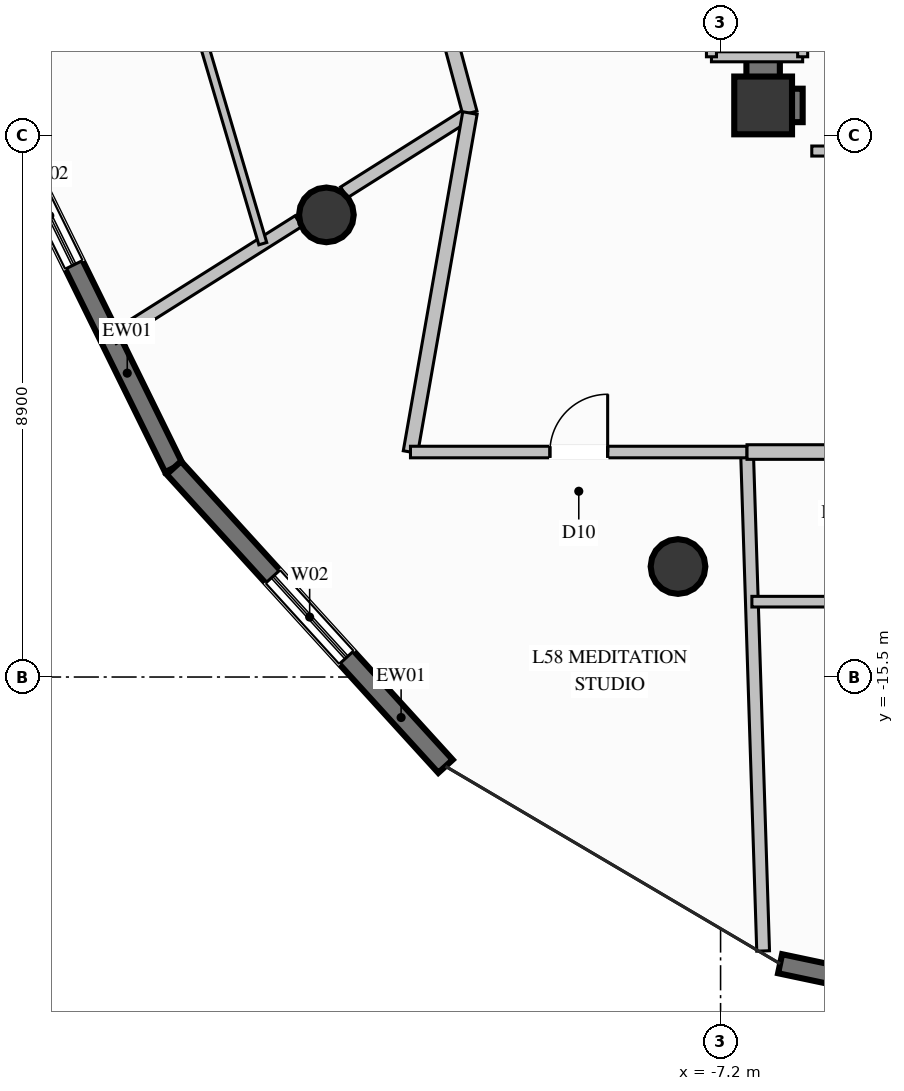
"""IFC4 building model, lengths in metres.
Left out: names, types, materials, properties, quantities, classifications, styles, units other than length and angle.
Written with IfcOpenShell. Run it as: python <this file> out.ifc"""

import sys

from ifc_helpers import new_model, si_unit, direction, frame, frame_2d, origin, origin_2d, place, context, subcontext, project, spatial, rectangle, circle, extrude, element, fill, save


model = new_model("IFC4")
c1 = context("Model", 3, precision=1e-05, world=origin(), true_north=direction((0.0, 1.0)))
c2 = subcontext(c1, "Body", "Model", "MODEL_VIEW")
j1 = project(units=[si_unit("LENGTHUNIT", "METRE"), si_unit("PLANEANGLEUNIT", "RADIAN")], contexts=[c1])
p1 = place(None, origin())
s1 = spatial("IfcSite", under=j1, at=p1, CompositionType="ELEMENT")
p2 = place(p1, origin())
s2 = spatial("IfcBuilding", under=s1, at=p2, CompositionType="ELEMENT")
p3 = place(p2, frame((0.0, 0.0, 223.6)))
s3 = spatial("IfcBuildingStorey", under=s2, at=p3, CompositionType="ELEMENT", Elevation=223.6)
p4 = place(p3, frame((-6.5, -6.1, 0.0), z_axis=(0.0, 0.0, 1.0), x_axis=(1.0, 0.0, 0.0)))
e1 = element("IfcColumn", 1, at=p4, inside=s3, PredefinedType="COLUMN", context=c2, shape_type="SweptSolid", body=[
    extrude(rectangle(XDim=0.95, YDim=0.95, at=origin_2d()), origin(), (0.0, 0.0, 1.0), 3.6),
])
p5 = place(p3, frame((-6.225, -6.1, 0.0), z_axis=(0.0, 0.0, 1.0), x_axis=(1.0, 0.0, 0.0)))
e2 = element("IfcWall", 2, at=p5, inside=s3, PredefinedType="SHEAR", context=c2, shape_type="SweptSolid", body=[
    extrude(rectangle(XDim=0.375, YDim=0.55, at=frame_2d((0.188, 0.0))), origin(), (0.0, 0.0, 1.0), 3.6),
])
p6 = place(p3, frame((-6.5, -6.375, 0.0), z_axis=(0.0, 0.0, 1.0), x_axis=(0.0, 1.0, 0.0)))
e3 = element("IfcWall", 3, at=p6, inside=s3, PredefinedType="SHEAR", context=c2, shape_type="SweptSolid", body=[
    extrude(rectangle(XDim=3.025, YDim=0.55, at=frame_2d((1.512, 0.0))), origin(), (0.0, 0.0, 1.0), 3.6),
])
for number, where, z_axis, x_axis in (
    (4, (-13.683, -7.9, 0.0), (0.0, 0.0, 1.0), (1.0, 0.0, 0.0)),
    (5, (-7.9, -13.683, 0.0), (0.0, 0.0, 1.0), (1.0, 0.0, 0.0)),
):
    element("IfcColumn", number, at=place(p3, frame(where, z_axis=z_axis, x_axis=x_axis)), inside=s3, PredefinedType="COLUMN", context=c2, shape_type="SweptSolid", body=[
        extrude(circle(Radius=0.45, at=origin_2d()), origin(), (0.0, 0.0, 1.0), 3.6),
    ])
p7 = place(p3, frame((-16.192, -12.06, 0.0), z_axis=(0.0, 0.0, 1.0), x_axis=(-0.441432699622, 0.897294361792, 0.0)))
e6 = element("IfcWall", 6, at=p7, inside=s3, PredefinedType="SOLIDWALL", context=c2, shape_type="SweptSolid", body=[
    extrude(rectangle(XDim=6.785, YDim=0.32, at=frame_2d((3.393, 0.0))), origin(), (0.0, 0.0, 1.0), 3.36),
])
p8 = place(p7, frame((3.721, 0.0, 0.35)))
e7 = element("IfcOpeningElement", 7, at=p8, cuts=e6, PredefinedType="OPENING", context=c2, shape_type="SweptSolid", body=[
    extrude(rectangle(XDim=1.8, YDim=2.6, at=frame_2d((0.9, 1.3))), frame((0.0, 0.17, 0.0), z_axis=(0.0, -1.0, 0.0), x_axis=(1.0, 0.0, 0.0)), (0.0, 0.0, 1.0), 0.34),
])
p9 = place(p3, frame((-11.724, -16.968, 0.0), z_axis=(0.0, 0.0, 1.0), x_axis=(-0.673166995422, 0.739490497758, 0.0)))
e8 = element("IfcWall", 8, at=p9, inside=s3, PredefinedType="SOLIDWALL", context=c2, shape_type="SweptSolid", body=[
    extrude(rectangle(XDim=6.637, YDim=0.32, at=frame_2d((3.318, 0.0))), origin(), (0.0, 0.0, 1.0), 3.36),
])
p10 = place(p9, frame((2.419, 0.0, 0.35)))
e9 = element("IfcOpeningElement", 9, at=p10, cuts=e8, PredefinedType="OPENING", context=c2, shape_type="SweptSolid", body=[
    extrude(rectangle(XDim=1.8, YDim=2.6, at=frame_2d((0.9, 1.3))), frame((0.0, 0.17, 0.0), z_axis=(0.0, -1.0, 0.0), x_axis=(1.0, 0.0, 0.0)), (0.0, 0.0, 1.0), 0.34),
])
p11 = place(p3, frame((-0.222, -21.483, 0.0), z_axis=(0.0, 0.0, 1.0), x_axis=(-0.978389375522, 0.206770959917, 0.0)))
e10 = element("IfcWall", 10, at=p11, inside=s3, PredefinedType="SOLIDWALL", context=c2, shape_type="SweptSolid", body=[
    extrude(rectangle(XDim=6.132, YDim=0.32, at=frame_2d((3.066, 0.0))), origin(), (0.0, 0.0, 1.0), 3.36),
])
p12 = place(p11, frame((2.166, 0.0, 0.35)))
e11 = element("IfcOpeningElement", 11, at=p12, cuts=e10, PredefinedType="OPENING", context=c2, shape_type="SweptSolid", body=[
    extrude(rectangle(XDim=1.8, YDim=2.6, at=frame_2d((0.9, 1.3))), frame((0.0, 0.17, 0.0), z_axis=(0.0, -1.0, 0.0), x_axis=(1.0, 0.0, 0.0)), (0.0, 0.0, 1.0), 0.34),
])
p13 = place(p3, frame((-7.35, -5.3, 0.0), z_axis=(0.0, 0.0, 1.0), x_axis=(1.0, 0.0, 0.0)))
e12 = element("IfcWall", 12, at=p13, inside=s3, PredefinedType="PARTITIONING", context=c2, shape_type="SweptSolid", body=[
    extrude(rectangle(XDim=1.5, YDim=0.165, at=frame_2d((0.75, 0.0))), origin(), (0.0, 0.0, 1.0), 2.445),
])
p14 = place(p3, frame((-5.85, -5.3, 0.0), z_axis=(0.0, 0.0, 1.0), x_axis=(0.0, 1.0, 0.0)))
e13 = element("IfcWall", 13, at=p14, inside=s3, PredefinedType="PARTITIONING", context=c2, shape_type="SweptSolid", body=[
    extrude(rectangle(XDim=2.5, YDim=0.165, at=frame_2d((1.25, 0.0))), origin(), (0.0, 0.0, 1.0), 2.445),
])
p15 = place(p3, frame((-7.35, -2.8, 0.0), z_axis=(0.0, 0.0, 1.0), x_axis=(0.0, -1.0, 0.0)))
e14 = element("IfcWall", 14, at=p15, inside=s3, PredefinedType="PARTITIONING", context=c2, shape_type="SweptSolid", body=[
    extrude(rectangle(XDim=2.5, YDim=0.165, at=frame_2d((1.25, 0.0))), origin(), (0.0, 0.0, 1.0), 3.36),
])
p16 = place(p15, frame((0.775, 0.0, 0.0)))
e15 = element("IfcOpeningElement", 15, at=p16, cuts=e14, PredefinedType="OPENING", context=c2, shape_type="SweptSolid", body=[
    extrude(rectangle(XDim=0.95, YDim=2.1, at=frame_2d((0.475, 1.05))), frame((0.0, 0.093, 0.0), z_axis=(0.0, -1.0, 0.0), x_axis=(1.0, 0.0, 0.0)), (0.0, 0.0, 1.0), 0.185),
])
p17 = place(p3, frame((-5.7, -6.85, 0.0), z_axis=(0.0, 0.0, 1.0), x_axis=(1.0, 0.0, 0.0)))
e16 = element("IfcWall", 16, at=p17, inside=s3, PredefinedType="PARTITIONING", context=c2, shape_type="SweptSolid", body=[
    extrude(rectangle(XDim=9.65, YDim=0.165, at=frame_2d((4.825, 0.0))), origin(), (0.0, 0.0, 1.0), 2.445),
])
p18 = place(p17, frame((4.35, 0.0, 0.0)))
e17 = element("IfcOpeningElement", 17, at=p18, cuts=e16, PredefinedType="OPENING", context=c2, shape_type="SweptSolid", body=[
    extrude(rectangle(XDim=0.95, YDim=2.1, at=frame_2d((0.475, 1.05))), frame((0.0, 0.093, 0.0), z_axis=(0.0, -1.0, 0.0), x_axis=(1.0, 0.0, 0.0)), (0.0, 0.0, 1.0), 0.185),
])
p19 = place(p3, frame((-11.322, -6.225, 0.0), z_axis=(0.0, 0.0, 1.0), x_axis=(-0.846059580186, -0.533088348001, 0.0)))
e18 = element("IfcWall", 18, at=p19, inside=s3, PredefinedType="PARTITIONING", context=c2, shape_type="SweptSolid", body=[
    extrude(rectangle(XDim=2.448, YDim=0.21, at=frame_2d((1.224, 0.0))), origin(), (0.0, 0.0, 1.0), 2.801),
])
p20 = place(p3, frame((-14.142, -8.003, 0.0), z_axis=(0.0, 0.0, 1.0), x_axis=(-0.84595942636, -0.533247268115, 0.0)))
e19 = element("IfcWall", 19, at=p20, inside=s3, PredefinedType="PARTITIONING", context=c2, shape_type="SweptSolid", body=[
    extrude(rectangle(XDim=3.61, YDim=0.21, at=frame_2d((1.805, 0.0))), origin(), (0.0, 0.0, 1.0), 3.36),
])
p21 = place(p3, frame((-13.05, 0.2, 0.0), z_axis=(0.0, 0.0, 1.0), x_axis=(0.259722121469, -0.965683395125, 0.0)))
e20 = element("IfcWall", 20, at=p21, inside=s3, PredefinedType="PARTITIONING", context=c2, shape_type="SweptSolid", body=[
    extrude(rectangle(XDim=6.653, YDim=0.24, at=frame_2d((3.327, 0.0))), origin(), (0.0, 0.0, 1.0), 3.36),
])
p22 = place(p3, frame((-17.225, 0.084, 0.0), z_axis=(0.0, 0.0, 1.0), x_axis=(0.283077593479, -0.959097010771, 0.0)))
e21 = element("IfcWall", 21, at=p22, inside=s3, PredefinedType="PARTITIONING", context=c2, shape_type="SweptSolid", body=[
    extrude(rectangle(XDim=8.818, YDim=0.135, at=frame_2d((4.409, 0.0))), origin(), (0.0, 0.0, 1.0), 3.36),
])
p23 = place(p22, frame((3.934, 0.0, 0.0)))
e22 = element("IfcOpeningElement", 22, at=p23, cuts=e21, PredefinedType="OPENING", context=c2, shape_type="SweptSolid", body=[
    extrude(rectangle(XDim=0.95, YDim=2.1, at=frame_2d((0.475, 1.05))), frame((0.0, 0.078, 0.0), z_axis=(0.0, -1.0, 0.0), x_axis=(1.0, 0.0, 0.0)), (0.0, 0.0, 1.0), 0.155),
])
p24 = place(p3, frame((-6.765, -11.8, 0.0), z_axis=(0.0, 0.0, 1.0), x_axis=(0.032268128202, -0.99947924836, 0.0)))
e23 = element("IfcWall", 23, at=p24, inside=s3, PredefinedType="PARTITIONING", context=c2, shape_type="SweptSolid", body=[
    extrude(rectangle(XDim=8.209, YDim=0.21, at=frame_2d((4.104, 0.0))), origin(), (0.0, 0.0, 1.0), 3.36),
])
p25 = place(p3, frame((-11.322, -6.225, 0.0), z_axis=(0.0, 0.0, 1.0), x_axis=(-0.172793604918, -0.984958054995, 0.0)))
e24 = element("IfcWall", 24, at=p25, inside=s3, PredefinedType="PARTITIONING", context=c2, shape_type="SweptSolid", body=[
    extrude(rectangle(XDim=5.66, YDim=0.24, at=frame_2d((2.83, 0.0))), origin(), (0.0, 0.0, 1.0), 3.36),
])
p26 = place(p3, frame((-12.3, -11.8, 0.0), z_axis=(0.0, 0.0, 1.0), x_axis=(1.0, 0.0, 0.0)))
e25 = element("IfcWall", 25, at=p26, inside=s3, PredefinedType="PARTITIONING", context=c2, shape_type="SweptSolid", body=[
    extrude(rectangle(XDim=5.535, YDim=0.19, at=frame_2d((2.768, 0.0))), origin(), (0.0, 0.0, 1.0), 3.36),
])
p27 = place(p26, frame((2.293, 0.0, 0.0)))
e26 = element("IfcOpeningElement", 26, at=p27, cuts=e25, PredefinedType="OPENING", context=c2, shape_type="SweptSolid", body=[
    extrude(rectangle(XDim=0.95, YDim=2.1, at=frame_2d((0.475, 1.05))), frame((0.0, 0.105, 0.0), z_axis=(0.0, -1.0, 0.0), x_axis=(1.0, 0.0, 0.0)), (0.0, 0.0, 1.0), 0.21),
])
p28 = place(p3, frame((-6.765, -11.8, 0.0), z_axis=(0.0, 0.0, 1.0), x_axis=(1.0, 0.0, 0.0)))
e27 = element("IfcWall", 27, at=p28, inside=s3, PredefinedType="PARTITIONING", context=c2, shape_type="SweptSolid", body=[
    extrude(rectangle(XDim=6.765, YDim=0.24, at=frame_2d((3.382, 0.0))), origin(), (0.0, 0.0, 1.0), 3.36),
])
p29 = place(p3, frame((-6.685, -14.261, 0.0), z_axis=(0.0, 0.0, 1.0), x_axis=(1.0, 0.0, 0.0)))
e28 = element("IfcWall", 28, at=p29, inside=s3, PredefinedType="PLUMBINGWALL", context=c2, shape_type="SweptSolid", body=[
    extrude(rectangle(XDim=6.685, YDim=0.175, at=frame_2d((3.343, 0.0))), origin(), (0.0, 0.0, 1.0), 2.929),
])
p30 = place(p8, origin())
e29 = element("IfcWindow", 29, at=p30, inside=s3, PartitioningType="SINGLE_PANEL", PredefinedType="WINDOW", context=c2, shape_type="SweptSolid", body=[
    extrude(rectangle(XDim=1.8, YDim=2.6, at=frame_2d((0.9, 1.3))), frame((0.0, 0.03, 0.0), z_axis=(0.0, -1.0, 0.0), x_axis=(1.0, 0.0, 0.0)), (0.0, 0.0, 1.0), 0.06),
])
fill(e7, e29)
p31 = place(p10, origin())
e30 = element("IfcWindow", 30, at=p31, inside=s3, PartitioningType="SINGLE_PANEL", PredefinedType="WINDOW", context=c2, shape_type="SweptSolid", body=[
    extrude(rectangle(XDim=1.8, YDim=2.6, at=frame_2d((0.9, 1.3))), frame((0.0, 0.03, 0.0), z_axis=(0.0, -1.0, 0.0), x_axis=(1.0, 0.0, 0.0)), (0.0, 0.0, 1.0), 0.06),
])
fill(e9, e30)
p32 = place(p27, origin())
e31 = element("IfcDoor", 31, at=p32, inside=s3, OperationType="SINGLE_SWING_RIGHT", PredefinedType="DOOR", context=c2, shape_type="SweptSolid", body=[
    extrude(rectangle(XDim=0.95, YDim=2.1, at=frame_2d((0.475, 1.05))), frame((0.0, 0.025, 0.0), z_axis=(0.0, -1.0, 0.0), x_axis=(1.0, 0.0, 0.0)), (0.0, 0.0, 1.0), 0.05),
])
fill(e26, e31)
save(model, sys.argv[1])
